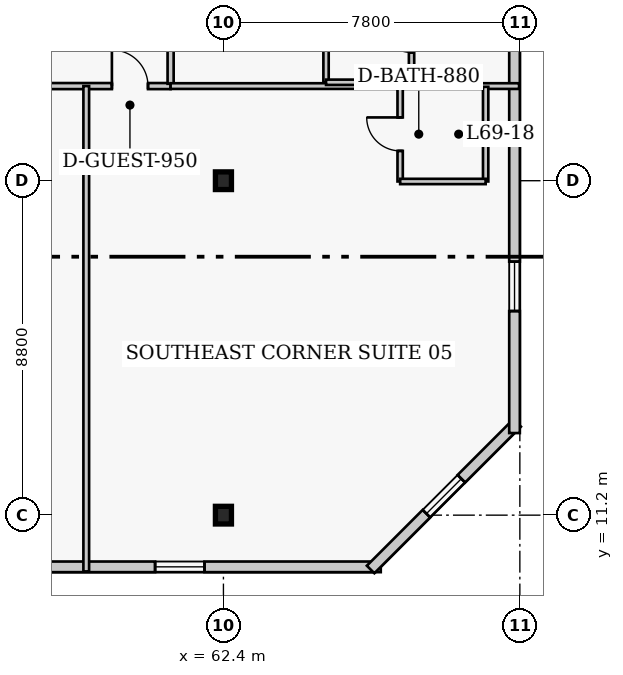
"""IFC4 building model, lengths in metres.
Left out: names, types, materials, properties, quantities, classifications, styles, units other than length and angle.
Written with IfcOpenShell. Run it as: python <this file> out.ifc"""

import sys

from ifc_helpers import new_model, si_unit, direction, frame, frame_2d, origin, origin_2d, place, context, subcontext, project, spatial, rectangle, i_section, extrude, element, fill, save


model = new_model("IFC4")
c1 = context("Model", 3, precision=1e-05, world=origin(), true_north=direction((0.0, 1.0)))
c2 = subcontext(c1, "Body", "Model", "MODEL_VIEW")
j1 = project(units=[si_unit("LENGTHUNIT", "METRE"), si_unit("PLANEANGLEUNIT", "RADIAN")], contexts=[c1])
p1 = place(None, origin())
s1 = spatial("IfcSite", under=j1, at=p1, CompositionType="ELEMENT")
p2 = place(p1, origin())
s2 = spatial("IfcBuilding", under=s1, at=p2, CompositionType="ELEMENT")
p3 = place(p2, frame((0.0, 0.0, 277.4)))
s3 = spatial("IfcBuildingStorey", under=s2, at=p3, CompositionType="ELEMENT", Elevation=277.4)
for number, where, z_axis, x_axis in (
    (1, (62.4, 11.2, 0.0), (0.0, 0.0, 1.0), (1.0, 0.0, 0.0)),
    (2, (62.4, 20.0, 0.0), (0.0, 0.0, 1.0), (1.0, 0.0, 0.0)),
):
    element("IfcColumn", number, at=place(p3, frame(where, z_axis=z_axis, x_axis=x_axis)), inside=s3, PredefinedType="COLUMN", context=c2, shape_type="SweptSolid", body=[
        extrude(i_section(OverallWidth=0.422, OverallDepth=0.465, WebThickness=0.045, FlangeThickness=0.073, FilletRadius=0.017, at=origin_2d()), origin(), (0.0, 0.0, 1.0), 4.0),
    ])
p4 = place(p3, frame((41.71, 9.84, 0.0), z_axis=(0.0, 0.0, 1.0), x_axis=(1.0, 0.0, 0.0)))
e3 = element("IfcWall", 3, at=p4, inside=s3, PredefinedType="SOLIDWALL", context=c2, shape_type="SweptSolid", body=[
    extrude(rectangle(XDim=24.83, YDim=0.28, at=frame_2d((12.415, 0.0))), origin(), (0.0, 0.0, 1.0), 3.76),
])
p5 = place(p4, frame((3.488, 0.0, 0.85)))
e4 = element("IfcOpeningElement", 4, at=p5, cuts=e3, PredefinedType="OPENING", context=c2, shape_type="SweptSolid", body=[
    extrude(rectangle(XDim=1.3, YDim=1.7, at=frame_2d((0.65, 0.85))), frame((0.0, 0.15, 0.0), z_axis=(0.0, -1.0, 0.0), x_axis=(1.0, 0.0, 0.0)), (0.0, 0.0, 1.0), 0.3),
])
p6 = place(p4, frame((11.115, 0.0, 0.85)))
e5 = element("IfcOpeningElement", 5, at=p6, cuts=e3, PredefinedType="OPENING", context=c2, shape_type="SweptSolid", body=[
    extrude(rectangle(XDim=1.3, YDim=1.7, at=frame_2d((0.65, 0.85))), frame((0.0, 0.15, 0.0), z_axis=(0.0, -1.0, 0.0), x_axis=(1.0, 0.0, 0.0)), (0.0, 0.0, 1.0), 0.3),
])
p7 = place(p4, frame((18.892, 0.0, 0.85)))
e6 = element("IfcOpeningElement", 6, at=p7, cuts=e3, PredefinedType="OPENING", context=c2, shape_type="SweptSolid", body=[
    extrude(rectangle(XDim=1.3, YDim=1.7, at=frame_2d((0.65, 0.85))), frame((0.0, 0.15, 0.0), z_axis=(0.0, -1.0, 0.0), x_axis=(1.0, 0.0, 0.0)), (0.0, 0.0, 1.0), 0.3),
])
p8 = place(p3, frame((66.273, 9.771, 0.0), z_axis=(0.0, 0.0, 1.0), x_axis=(0.707129162587, 0.707084399077, 0.0)))
e7 = element("IfcWall", 7, at=p8, inside=s3, PredefinedType="SOLIDWALL", context=c2, shape_type="SweptSolid", body=[
    extrude(rectangle(XDim=5.454, YDim=0.28, at=frame_2d((2.727, 0.0))), origin(), (0.0, 0.0, 1.0), 3.76),
])
p9 = place(p8, frame((2.077, 0.0, 0.85)))
e8 = element("IfcOpeningElement", 8, at=p9, cuts=e7, PredefinedType="OPENING", context=c2, shape_type="SweptSolid", body=[
    extrude(rectangle(XDim=1.3, YDim=1.7, at=frame_2d((0.65, 0.85))), frame((0.0, 0.15, 0.0), z_axis=(0.0, -1.0, 0.0), x_axis=(1.0, 0.0, 0.0)), (0.0, 0.0, 1.0), 0.3),
])
p10 = place(p3, frame((70.06, 13.36, 0.0), z_axis=(0.0, 0.0, 1.0), x_axis=(0.0, 1.0, 0.0)))
e9 = element("IfcWall", 9, at=p10, inside=s3, PredefinedType="SOLIDWALL", context=c2, shape_type="SweptSolid", body=[
    extrude(rectangle(XDim=30.88, YDim=0.28, at=frame_2d((15.44, 0.0))), origin(), (0.0, 0.0, 1.0), 3.76),
])
p11 = place(p10, frame((3.21, 0.0, 0.85)))
e10 = element("IfcOpeningElement", 10, at=p11, cuts=e9, PredefinedType="OPENING", context=c2, shape_type="SweptSolid", body=[
    extrude(rectangle(XDim=1.3, YDim=1.7, at=frame_2d((0.65, 0.85))), frame((0.0, 0.15, 0.0), z_axis=(0.0, -1.0, 0.0), x_axis=(1.0, 0.0, 0.0)), (0.0, 0.0, 1.0), 0.3),
])
p12 = place(p10, frame((10.93, 0.0, 0.85)))
e11 = element("IfcOpeningElement", 11, at=p12, cuts=e9, PredefinedType="OPENING", context=c2, shape_type="SweptSolid", body=[
    extrude(rectangle(XDim=1.3, YDim=1.7, at=frame_2d((0.65, 0.85))), frame((0.0, 0.15, 0.0), z_axis=(0.0, -1.0, 0.0), x_axis=(1.0, 0.0, 0.0)), (0.0, 0.0, 1.0), 0.3),
])
p13 = place(p10, frame((18.65, 0.0, 0.85)))
e12 = element("IfcOpeningElement", 12, at=p13, cuts=e9, PredefinedType="OPENING", context=c2, shape_type="SweptSolid", body=[
    extrude(rectangle(XDim=1.3, YDim=1.7, at=frame_2d((0.65, 0.85))), frame((0.0, 0.15, 0.0), z_axis=(0.0, -1.0, 0.0), x_axis=(1.0, 0.0, 0.0)), (0.0, 0.0, 1.0), 0.3),
])
p14 = place(p10, frame((26.37, 0.0, 0.85)))
e13 = element("IfcOpeningElement", 13, at=p14, cuts=e9, PredefinedType="OPENING", context=c2, shape_type="SweptSolid", body=[
    extrude(rectangle(XDim=1.3, YDim=1.7, at=frame_2d((0.65, 0.85))), frame((0.0, 0.15, 0.0), z_axis=(0.0, -1.0, 0.0), x_axis=(1.0, 0.0, 0.0)), (0.0, 0.0, 1.0), 0.3),
])
p15 = place(p3, frame((35.8, 22.49, 0.0), z_axis=(0.0, 0.0, 1.0), x_axis=(1.0, 0.0, 0.0)))
e14 = element("IfcWall", 14, at=p15, inside=s3, PredefinedType="PARTITIONING", context=c2, shape_type="SweptSolid", body=[
    extrude(rectangle(XDim=25.21, YDim=0.16, at=frame_2d((12.605, 0.0))), origin(), (0.0, 0.0, 1.0), 3.76),
])
p16 = place(p15, frame((5.522, 0.0, 0.0)))
e15 = element("IfcOpeningElement", 15, at=p16, cuts=e14, PredefinedType="OPENING", context=c2, shape_type="SweptSolid", body=[
    extrude(rectangle(XDim=1.0, YDim=2.15, at=frame_2d((0.5, 1.075))), frame((0.0, 0.09, 0.0), z_axis=(0.0, -1.0, 0.0), x_axis=(1.0, 0.0, 0.0)), (0.0, 0.0, 1.0), 0.18),
])
p17 = place(p15, frame((18.198, 0.0, 0.0)))
e16 = element("IfcOpeningElement", 16, at=p17, cuts=e14, PredefinedType="OPENING", context=c2, shape_type="SweptSolid", body=[
    extrude(rectangle(XDim=0.95, YDim=2.1, at=frame_2d((0.475, 1.05))), frame((0.0, 0.09, 0.0), z_axis=(0.0, -1.0, 0.0), x_axis=(1.0, 0.0, 0.0)), (0.0, 0.0, 1.0), 0.18),
])
p18 = place(p15, frame((23.665, 0.0, 0.0)))
e17 = element("IfcOpeningElement", 17, at=p18, cuts=e14, PredefinedType="OPENING", context=c2, shape_type="SweptSolid", body=[
    extrude(rectangle(XDim=0.95, YDim=2.1, at=frame_2d((0.475, 1.05))), frame((0.0, 0.09, 0.0), z_axis=(0.0, -1.0, 0.0), x_axis=(1.0, 0.0, 0.0)), (0.0, 0.0, 1.0), 0.18),
])
p19 = place(p3, frame((61.01, 22.55, 0.0), z_axis=(0.0, 0.0, 1.0), x_axis=(0.0, 1.0, 0.0)))
e18 = element("IfcWall", 18, at=p19, inside=s3, PredefinedType="PARTITIONING", context=c2, shape_type="SweptSolid", body=[
    extrude(rectangle(XDim=18.1, YDim=0.16, at=frame_2d((9.05, 0.0))), origin(), (0.0, 0.0, 1.0), 3.76),
])
p20 = place(p19, frame((2.65, 0.0, 0.0)))
e19 = element("IfcOpeningElement", 19, at=p20, cuts=e18, PredefinedType="OPENING", context=c2, shape_type="SweptSolid", body=[
    extrude(rectangle(XDim=0.95, YDim=2.1, at=frame_2d((0.475, 1.05))), frame((0.0, 0.09, 0.0), z_axis=(0.0, -1.0, 0.0), x_axis=(1.0, 0.0, 0.0)), (0.0, 0.0, 1.0), 0.18),
])
p21 = place(p19, frame((9.175, 0.0, 0.0)))
e20 = element("IfcOpeningElement", 20, at=p21, cuts=e18, PredefinedType="OPENING", context=c2, shape_type="SweptSolid", body=[
    extrude(rectangle(XDim=0.95, YDim=2.1, at=frame_2d((0.475, 1.05))), frame((0.0, 0.09, 0.0), z_axis=(0.0, -1.0, 0.0), x_axis=(1.0, 0.0, 0.0)), (0.0, 0.0, 1.0), 0.18),
])
p22 = place(p19, frame((13.6, 0.0, 0.0)))
e21 = element("IfcOpeningElement", 21, at=p22, cuts=e18, PredefinedType="OPENING", context=c2, shape_type="SweptSolid", body=[
    extrude(rectangle(XDim=1.0, YDim=2.15, at=frame_2d((0.5, 1.075))), frame((0.0, 0.09, 0.0), z_axis=(0.0, -1.0, 0.0), x_axis=(1.0, 0.0, 0.0)), (0.0, 0.0, 1.0), 0.18),
])
p23 = place(p3, frame((58.79, 9.72, 0.0), z_axis=(0.0, 0.0, 1.0), x_axis=(0.0, 1.0, 0.0)))
e22 = element("IfcWall", 22, at=p23, inside=s3, PredefinedType="PARTITIONING", context=c2, shape_type="SweptSolid", body=[
    extrude(rectangle(XDim=12.77, YDim=0.15, at=frame_2d((6.385, 0.0))), origin(), (0.0, 0.0, 1.0), 3.76),
])
p24 = place(p3, frame((61.01, 22.49, 0.0), z_axis=(0.0, 0.0, 1.0), x_axis=(1.0, 0.0, 0.0)))
e23 = element("IfcWall", 23, at=p24, inside=s3, PredefinedType="PARTITIONING", context=c2, shape_type="SweptSolid", body=[
    extrude(rectangle(XDim=9.17, YDim=0.15, at=frame_2d((4.585, 0.0))), origin(), (0.0, 0.0, 1.0), 3.76),
])
p25 = place(p3, frame((67.05, 19.98, 0.0), z_axis=(0.0, 0.0, 1.0), x_axis=(0.0, 1.0, 0.0)))
e24 = element("IfcWall", 24, at=p25, inside=s3, PredefinedType="PLUMBINGWALL", context=c2, shape_type="SweptSolid", body=[
    extrude(rectangle(XDim=2.49, YDim=0.14, at=frame_2d((1.245, 0.0))), origin(), (0.0, 0.0, 1.0), 3.76),
])
p26 = place(p25, frame((0.805, 0.0, 0.0)))
e25 = element("IfcOpeningElement", 25, at=p26, cuts=e24, PredefinedType="OPENING", context=c2, shape_type="SweptSolid", body=[
    extrude(rectangle(XDim=0.88, YDim=2.05, at=frame_2d((0.44, 1.025))), frame((0.0, 0.08, 0.0), z_axis=(0.0, -1.0, 0.0), x_axis=(1.0, 0.0, 0.0)), (0.0, 0.0, 1.0), 0.16),
])
p27 = place(p3, frame((69.3, 19.98, 0.0), z_axis=(0.0, 0.0, 1.0), x_axis=(0.0, 1.0, 0.0)))
e26 = element("IfcWall", 26, at=p27, inside=s3, PredefinedType="PLUMBINGWALL", context=c2, shape_type="SweptSolid", body=[
    extrude(rectangle(XDim=2.49, YDim=0.14, at=frame_2d((1.245, 0.0))), origin(), (0.0, 0.0, 1.0), 3.76),
])
p28 = place(p3, frame((67.05, 19.98, 0.0), z_axis=(0.0, 0.0, 1.0), x_axis=(1.0, 0.0, 0.0)))
e27 = element("IfcWall", 27, at=p28, inside=s3, PredefinedType="PLUMBINGWALL", context=c2, shape_type="SweptSolid", body=[
    extrude(rectangle(XDim=2.25, YDim=0.14, at=frame_2d((1.125, 0.0))), origin(), (0.0, 0.0, 1.0), 3.76),
])
p29 = place(p3, frame((65.1, 22.59, 0.0), z_axis=(0.0, 0.0, 1.0), x_axis=(0.0, 1.0, 0.0)))
e28 = element("IfcWall", 28, at=p29, inside=s3, PredefinedType="PLUMBINGWALL", context=c2, shape_type="SweptSolid", body=[
    extrude(rectangle(XDim=2.45, YDim=0.14, at=frame_2d((1.225, 0.0))), origin(), (0.0, 0.0, 1.0), 3.76),
])
p30 = place(p3, frame((67.35, 22.59, 0.0), z_axis=(0.0, 0.0, 1.0), x_axis=(0.0, 1.0, 0.0)))
e29 = element("IfcWall", 29, at=p30, inside=s3, PredefinedType="PLUMBINGWALL", context=c2, shape_type="SweptSolid", body=[
    extrude(rectangle(XDim=2.45, YDim=0.14, at=frame_2d((1.225, 0.0))), origin(), (0.0, 0.0, 1.0), 3.76),
])
p31 = place(p30, frame((0.785, 0.0, 0.0)))
e30 = element("IfcOpeningElement", 30, at=p31, cuts=e29, PredefinedType="OPENING", context=c2, shape_type="SweptSolid", body=[
    extrude(rectangle(XDim=0.88, YDim=2.05, at=frame_2d((0.44, 1.025))), frame((0.0, 0.08, 0.0), z_axis=(0.0, -1.0, 0.0), x_axis=(1.0, 0.0, 0.0)), (0.0, 0.0, 1.0), 0.16),
])
p32 = place(p3, frame((65.1, 22.59, 0.0), z_axis=(0.0, 0.0, 1.0), x_axis=(1.0, 0.0, 0.0)))
e31 = element("IfcWall", 31, at=p32, inside=s3, PredefinedType="PLUMBINGWALL", context=c2, shape_type="SweptSolid", body=[
    extrude(rectangle(XDim=2.25, YDim=0.14, at=frame_2d((1.125, 0.0))), origin(), (0.0, 0.0, 1.0), 3.76),
])
p33 = place(p7, origin())
e32 = element("IfcWindow", 32, at=p33, inside=s3, PartitioningType="SINGLE_PANEL", PredefinedType="WINDOW", context=c2, shape_type="SweptSolid", body=[
    extrude(rectangle(XDim=1.3, YDim=1.7, at=frame_2d((0.65, 0.85))), frame((0.0, 0.03, 0.0), z_axis=(0.0, -1.0, 0.0), x_axis=(1.0, 0.0, 0.0)), (0.0, 0.0, 1.0), 0.06),
])
fill(e6, e32)
p34 = place(p9, origin())
e33 = element("IfcWindow", 33, at=p34, inside=s3, PartitioningType="SINGLE_PANEL", PredefinedType="WINDOW", context=c2, shape_type="SweptSolid", body=[
    extrude(rectangle(XDim=1.3, YDim=1.7, at=frame_2d((0.65, 0.85))), frame((0.0, 0.03, 0.0), z_axis=(0.0, -1.0, 0.0), x_axis=(1.0, 0.0, 0.0)), (0.0, 0.0, 1.0), 0.06),
])
fill(e8, e33)
p35 = place(p11, origin())
e34 = element("IfcWindow", 34, at=p35, inside=s3, PartitioningType="SINGLE_PANEL", PredefinedType="WINDOW", context=c2, shape_type="SweptSolid", body=[
    extrude(rectangle(XDim=1.3, YDim=1.7, at=frame_2d((0.65, 0.85))), frame((0.0, 0.03, 0.0), z_axis=(0.0, -1.0, 0.0), x_axis=(1.0, 0.0, 0.0)), (0.0, 0.0, 1.0), 0.06),
])
fill(e10, e34)
p36 = place(p26, origin())
e35 = element("IfcDoor", 35, at=p36, inside=s3, OperationType="SINGLE_SWING_RIGHT", PredefinedType="DOOR", context=c2, shape_type="SweptSolid", body=[
    extrude(rectangle(XDim=0.88, YDim=2.05, at=frame_2d((0.44, 1.025))), frame((0.0, 0.025, 0.0), z_axis=(0.0, -1.0, 0.0), x_axis=(1.0, 0.0, 0.0)), (0.0, 0.0, 1.0), 0.05),
])
fill(e25, e35)
p37 = place(p18, origin())
e36 = element("IfcDoor", 36, at=p37, inside=s3, OperationType="SINGLE_SWING_LEFT", PredefinedType="DOOR", context=c2, shape_type="SweptSolid", body=[
    extrude(rectangle(XDim=0.95, YDim=2.1, at=frame_2d((0.475, 1.05))), frame((0.0, 0.025, 0.0), z_axis=(0.0, -1.0, 0.0), x_axis=(1.0, 0.0, 0.0)), (0.0, 0.0, 1.0), 0.05),
])
fill(e17, e36)
p38 = place(p31, origin())
e37 = element("IfcDoor", 37, at=p38, inside=s3, OperationType="SINGLE_SWING_RIGHT", PredefinedType="DOOR", context=c2, shape_type="SweptSolid", body=[
    extrude(rectangle(XDim=0.88, YDim=2.05, at=frame_2d((0.44, 1.025))), frame((0.0, 0.025, 0.0), z_axis=(0.0, -1.0, 0.0), x_axis=(1.0, 0.0, 0.0)), (0.0, 0.0, 1.0), 0.05),
])
fill(e30, e37)
save(model, sys.argv[1])
